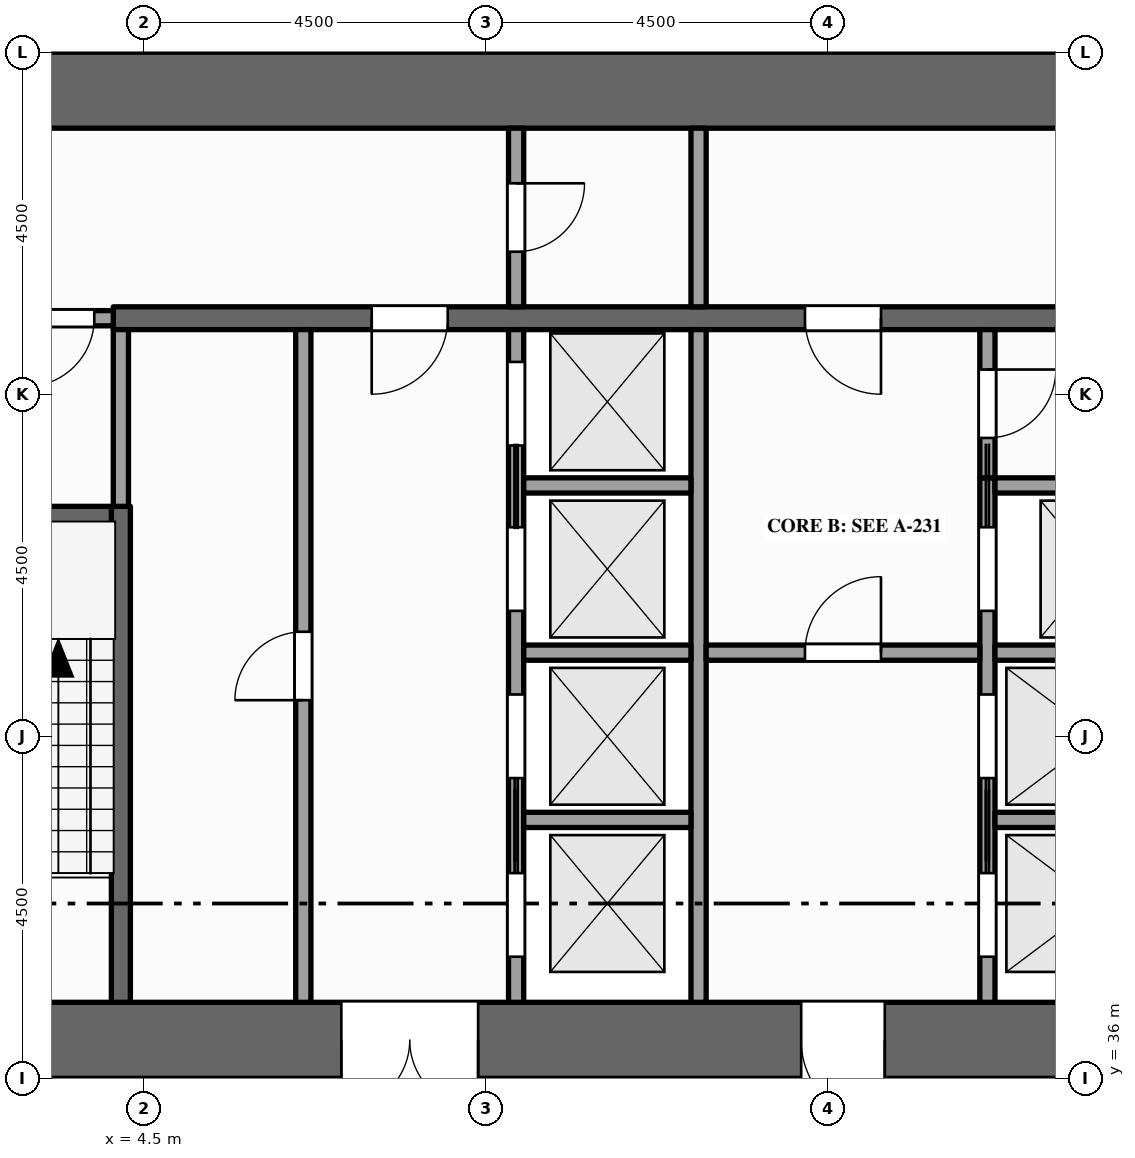
"""IFC4 building model, lengths in metres.
Left out: names, types, materials, properties, quantities, classifications, styles, units other than length and angle.
Written with IfcOpenShell. Run it as: python <this file> out.ifc"""

import sys

from ifc_helpers import new_model, si_unit, direction, frame, frame_2d, origin, place, context, subcontext, project, spatial, rectangle, extrude, element, fill, save


model = new_model("IFC4")
c1 = context("Model", 3, precision=1e-05, world=origin(), true_north=direction((0.0, 1.0)))
c2 = subcontext(c1, "Body", "Model", "MODEL_VIEW")
j1 = project(units=[si_unit("LENGTHUNIT", "METRE"), si_unit("PLANEANGLEUNIT", "RADIAN")], contexts=[c1])
p1 = place(None, origin())
s1 = spatial("IfcSite", under=j1, at=p1, CompositionType="ELEMENT")
p2 = place(p1, origin())
s2 = spatial("IfcBuilding", under=s1, at=p2, CompositionType="ELEMENT")
p3 = place(p2, frame((0.0, 0.0, 171.0)))
s3 = spatial("IfcBuildingStorey", under=s2, at=p3, CompositionType="ELEMENT", Elevation=171.0)
p4 = place(p3, frame((0.0, 36.5, -0.15), z_axis=(0.0, 0.0, 1.0), x_axis=(1.0, 0.0, 0.0)))
e1 = element("IfcWall", 1, at=p4, inside=s3, PredefinedType="SHEAR", context=c2, shape_type="SweptSolid", body=[
    extrude(rectangle(XDim=22.5, YDim=1.0, at=frame_2d((11.25, 0.0))), origin(), (0.0, 0.0, 1.0), 4.0),
])
p5 = place(p4, frame((7.1, 0.0, 0.15)))
e2 = element("IfcOpeningElement", 2, at=p5, cuts=e1, PredefinedType="OPENING", context=c2, shape_type="SweptSolid", body=[
    extrude(rectangle(XDim=1.8, YDim=2.1, at=frame_2d((0.9, 1.05))), frame((0.0, 0.51, 0.0), z_axis=(0.0, -1.0, 0.0), x_axis=(1.0, 0.0, 0.0)), (0.0, 0.0, 1.0), 1.02),
])
p6 = place(p4, frame((13.15, 0.0, 0.15)))
e3 = element("IfcOpeningElement", 3, at=p6, cuts=e1, PredefinedType="OPENING", context=c2, shape_type="SweptSolid", body=[
    extrude(rectangle(XDim=1.1, YDim=2.1, at=frame_2d((0.55, 1.05))), frame((0.0, 0.51, 0.0), z_axis=(0.0, -1.0, 0.0), x_axis=(1.0, 0.0, 0.0)), (0.0, 0.0, 1.0), 1.02),
])
p7 = place(p4, frame((2.15, 0.0, 0.15)))
e4 = element("IfcOpeningElement", 4, at=p7, cuts=e1, PredefinedType="OPENING", context=c2, shape_type="SweptSolid", body=[
    extrude(rectangle(XDim=1.1, YDim=2.1, at=frame_2d((0.55, 1.05))), frame((0.0, 0.51, 0.0), z_axis=(0.0, -1.0, 0.0), x_axis=(1.0, 0.0, 0.0)), (0.0, 0.0, 1.0), 1.02),
])
p8 = place(p4, frame((19.35, 0.0, 0.15)))
e5 = element("IfcOpeningElement", 5, at=p8, cuts=e1, PredefinedType="OPENING", context=c2, shape_type="SweptSolid", body=[
    extrude(rectangle(XDim=1.1, YDim=2.1, at=frame_2d((0.55, 1.05))), frame((0.0, 0.51, 0.0), z_axis=(0.0, -1.0, 0.0), x_axis=(1.0, 0.0, 0.0)), (0.0, 0.0, 1.0), 1.02),
])
p9 = place(p3, frame((0.0, 49.0, -0.15), z_axis=(0.0, 0.0, 1.0), x_axis=(1.0, 0.0, 0.0)))
e6 = element("IfcWall", 6, at=p9, inside=s3, PredefinedType="SHEAR", context=c2, shape_type="SweptSolid", body=[
    extrude(rectangle(XDim=22.5, YDim=1.0, at=frame_2d((11.25, 0.0))), origin(), (0.0, 0.0, 1.0), 4.0),
])
p10 = place(p3, frame((4.2, 37.0, 0.0), z_axis=(0.0, 0.0, 1.0), x_axis=(0.0, 1.0, 0.0)))
e7 = element("IfcWall", 7, at=p10, inside=s3, PredefinedType="SHEAR", context=c2, shape_type="SweptSolid", body=[
    extrude(rectangle(XDim=6.525, YDim=0.25, at=frame_2d((3.262, 0.0))), origin(), (0.0, 0.0, 1.0), 3.85),
])
p11 = place(p3, frame((4.2, 43.525, 0.0), z_axis=(0.0, 0.0, 1.0), x_axis=(0.0, 1.0, 0.0)))
e8 = element("IfcWall", 8, at=p11, inside=s3, PredefinedType="PARTITIONING", context=c2, shape_type="SweptSolid", body=[
    extrude(rectangle(XDim=2.325, YDim=0.2, at=frame_2d((1.163, 0.0))), origin(), (0.0, 0.0, 1.0), 3.85),
])
p12 = place(p3, frame((6.6, 37.0, 0.0), z_axis=(0.0, 0.0, 1.0), x_axis=(0.0, 1.0, 0.0)))
e9 = element("IfcWall", 9, at=p12, inside=s3, PredefinedType="PARTITIONING", context=c2, shape_type="SweptSolid", body=[
    extrude(rectangle(XDim=8.85, YDim=0.2, at=frame_2d((4.425, 0.0))), origin(), (0.0, 0.0, 1.0), 3.85),
])
p13 = place(p12, frame((3.975, 0.0, 0.0)))
e10 = element("IfcOpeningElement", 10, at=p13, cuts=e9, PredefinedType="OPENING", context=c2, shape_type="SweptSolid", body=[
    extrude(rectangle(XDim=0.9, YDim=2.1, at=frame_2d((0.45, 1.05))), frame((0.0, 0.11, 0.0), z_axis=(0.0, -1.0, 0.0), x_axis=(1.0, 0.0, 0.0)), (0.0, 0.0, 1.0), 0.22),
])
p14 = place(p3, frame((9.4, 37.0, 0.0), z_axis=(0.0, 0.0, 1.0), x_axis=(0.0, 1.0, 0.0)))
e11 = element("IfcWall", 11, at=p14, inside=s3, PredefinedType="SOLIDWALL", context=c2, shape_type="SweptSolid", body=[
    extrude(rectangle(XDim=8.85, YDim=0.2, at=frame_2d((4.425, 0.0))), origin(), (0.0, 0.0, 1.0), 3.85),
])
p15 = place(p14, frame((0.6, 0.0, 0.012)))
e12 = element("IfcOpeningElement", 12, at=p15, cuts=e11, PredefinedType="OPENING", context=c2, shape_type="SweptSolid", body=[
    extrude(rectangle(XDim=1.1, YDim=2.1, at=frame_2d((0.55, 1.05))), frame((0.0, 0.11, 0.0), z_axis=(0.0, -1.0, 0.0), x_axis=(1.0, 0.0, 0.0)), (0.0, 0.0, 1.0), 0.22),
])
p16 = place(p14, frame((2.95, 0.0, 0.012)))
e13 = element("IfcOpeningElement", 13, at=p16, cuts=e11, PredefinedType="OPENING", context=c2, shape_type="SweptSolid", body=[
    extrude(rectangle(XDim=1.1, YDim=2.1, at=frame_2d((0.55, 1.05))), frame((0.0, 0.11, 0.0), z_axis=(0.0, -1.0, 0.0), x_axis=(1.0, 0.0, 0.0)), (0.0, 0.0, 1.0), 0.22),
])
p17 = place(p14, frame((5.15, 0.0, 0.012)))
e14 = element("IfcOpeningElement", 14, at=p17, cuts=e11, PredefinedType="OPENING", context=c2, shape_type="SweptSolid", body=[
    extrude(rectangle(XDim=1.1, YDim=2.1, at=frame_2d((0.55, 1.05))), frame((0.0, 0.11, 0.0), z_axis=(0.0, -1.0, 0.0), x_axis=(1.0, 0.0, 0.0)), (0.0, 0.0, 1.0), 0.22),
])
p18 = place(p14, frame((7.325, 0.0, 0.012)))
e15 = element("IfcOpeningElement", 15, at=p18, cuts=e11, PredefinedType="OPENING", context=c2, shape_type="SweptSolid", body=[
    extrude(rectangle(XDim=1.1, YDim=2.1, at=frame_2d((0.55, 1.05))), frame((0.0, 0.11, 0.0), z_axis=(0.0, -1.0, 0.0), x_axis=(1.0, 0.0, 0.0)), (0.0, 0.0, 1.0), 0.22),
])
p19 = place(p3, frame((9.4, 46.15, 0.0), z_axis=(0.0, 0.0, 1.0), x_axis=(0.0, 1.0, 0.0)))
e16 = element("IfcWall", 16, at=p19, inside=s3, PredefinedType="PARTITIONING", context=c2, shape_type="SweptSolid", body=[
    extrude(rectangle(XDim=2.35, YDim=0.2, at=frame_2d((1.175, 0.0))), origin(), (0.0, 0.0, 1.0), 3.85),
])
p20 = place(p19, frame((0.725, 0.0, 0.0)))
e17 = element("IfcOpeningElement", 17, at=p20, cuts=e16, PredefinedType="OPENING", context=c2, shape_type="SweptSolid", body=[
    extrude(rectangle(XDim=0.9, YDim=2.1, at=frame_2d((0.45, 1.05))), frame((0.0, 0.11, 0.0), z_axis=(0.0, -1.0, 0.0), x_axis=(1.0, 0.0, 0.0)), (0.0, 0.0, 1.0), 0.22),
])
p21 = place(p3, frame((11.8, 37.0, 0.0), z_axis=(0.0, 0.0, 1.0), x_axis=(0.0, 1.0, 0.0)))
e18 = element("IfcWall", 18, at=p21, inside=s3, PredefinedType="SOLIDWALL", context=c2, shape_type="SweptSolid", body=[
    extrude(rectangle(XDim=8.85, YDim=0.2, at=frame_2d((4.425, 0.0))), origin(), (0.0, 0.0, 1.0), 3.85),
])
p22 = place(p3, frame((11.8, 46.15, 0.0), z_axis=(0.0, 0.0, 1.0), x_axis=(0.0, 1.0, 0.0)))
e19 = element("IfcWall", 19, at=p22, inside=s3, PredefinedType="PARTITIONING", context=c2, shape_type="SweptSolid", body=[
    extrude(rectangle(XDim=2.35, YDim=0.2, at=frame_2d((1.175, 0.0))), origin(), (0.0, 0.0, 1.0), 3.85),
])
p23 = place(p3, frame((15.6, 37.0, 0.0), z_axis=(0.0, 0.0, 1.0), x_axis=(0.0, 1.0, 0.0)))
e20 = element("IfcWall", 20, at=p23, inside=s3, PredefinedType="SOLIDWALL", context=c2, shape_type="SweptSolid", body=[
    extrude(rectangle(XDim=6.9, YDim=0.2, at=frame_2d((3.45, 0.0))), origin(), (0.0, 0.0, 1.0), 3.85),
])
p24 = place(p23, frame((0.6, 0.0, 0.012)))
e21 = element("IfcOpeningElement", 21, at=p24, cuts=e20, PredefinedType="OPENING", context=c2, shape_type="SweptSolid", body=[
    extrude(rectangle(XDim=1.1, YDim=2.1, at=frame_2d((0.55, 1.05))), frame((0.0, 0.11, 0.0), z_axis=(0.0, -1.0, 0.0), x_axis=(1.0, 0.0, 0.0)), (0.0, 0.0, 1.0), 0.22),
])
p25 = place(p23, frame((2.95, 0.0, 0.012)))
e22 = element("IfcOpeningElement", 22, at=p25, cuts=e20, PredefinedType="OPENING", context=c2, shape_type="SweptSolid", body=[
    extrude(rectangle(XDim=1.1, YDim=2.1, at=frame_2d((0.55, 1.05))), frame((0.0, 0.11, 0.0), z_axis=(0.0, -1.0, 0.0), x_axis=(1.0, 0.0, 0.0)), (0.0, 0.0, 1.0), 0.22),
])
p26 = place(p23, frame((5.15, 0.0, 0.012)))
e23 = element("IfcOpeningElement", 23, at=p26, cuts=e20, PredefinedType="OPENING", context=c2, shape_type="SweptSolid", body=[
    extrude(rectangle(XDim=1.1, YDim=2.1, at=frame_2d((0.55, 1.05))), frame((0.0, 0.11, 0.0), z_axis=(0.0, -1.0, 0.0), x_axis=(1.0, 0.0, 0.0)), (0.0, 0.0, 1.0), 0.22),
])
p27 = place(p3, frame((15.6, 43.9, 0.0), z_axis=(0.0, 0.0, 1.0), x_axis=(0.0, 1.0, 0.0)))
e24 = element("IfcWall", 24, at=p27, inside=s3, PredefinedType="PARTITIONING", context=c2, shape_type="SweptSolid", body=[
    extrude(rectangle(XDim=1.95, YDim=0.2, at=frame_2d((0.975, 0.0))), origin(), (0.0, 0.0, 1.0), 3.85),
])
p28 = place(p27, frame((0.525, 0.0, 0.0)))
e25 = element("IfcOpeningElement", 25, at=p28, cuts=e24, PredefinedType="OPENING", context=c2, shape_type="SweptSolid", body=[
    extrude(rectangle(XDim=0.9, YDim=2.1, at=frame_2d((0.45, 1.05))), frame((0.0, 0.11, 0.0), z_axis=(0.0, -1.0, 0.0), x_axis=(1.0, 0.0, 0.0)), (0.0, 0.0, 1.0), 0.22),
])
p29 = place(p3, frame((9.5, 39.4, 0.0), z_axis=(0.0, 0.0, 1.0), x_axis=(1.0, 0.0, 0.0)))
e26 = element("IfcWall", 26, at=p29, inside=s3, PredefinedType="SOLIDWALL", context=c2, shape_type="SweptSolid", body=[
    extrude(rectangle(XDim=2.2, YDim=0.2, at=frame_2d((1.1, 0.0))), origin(), (0.0, 0.0, 1.0), 3.85),
])
p30 = place(p3, frame((15.7, 39.4, 0.0), z_axis=(0.0, 0.0, 1.0), x_axis=(1.0, 0.0, 0.0)))
e27 = element("IfcWall", 27, at=p30, inside=s3, PredefinedType="SOLIDWALL", context=c2, shape_type="SweptSolid", body=[
    extrude(rectangle(XDim=2.675, YDim=0.2, at=frame_2d((1.337, 0.0))), origin(), (0.0, 0.0, 1.0), 3.85),
])
p31 = place(p3, frame((9.5, 41.6, 0.0), z_axis=(0.0, 0.0, 1.0), x_axis=(1.0, 0.0, 0.0)))
e28 = element("IfcWall", 28, at=p31, inside=s3, PredefinedType="SOLIDWALL", context=c2, shape_type="SweptSolid", body=[
    extrude(rectangle(XDim=2.2, YDim=0.2, at=frame_2d((1.1, 0.0))), origin(), (0.0, 0.0, 1.0), 3.85),
])
p32 = place(p3, frame((11.9, 41.6, 0.0), z_axis=(0.0, 0.0, 1.0), x_axis=(1.0, 0.0, 0.0)))
e29 = element("IfcWall", 29, at=p32, inside=s3, PredefinedType="PARTITIONING", context=c2, shape_type="SweptSolid", body=[
    extrude(rectangle(XDim=3.6, YDim=0.2, at=frame_2d((1.8, 0.0))), origin(), (0.0, 0.0, 1.0), 3.85),
])
p33 = place(p32, frame((1.3, 0.0, 0.0)))
e30 = element("IfcOpeningElement", 30, at=p33, cuts=e29, PredefinedType="OPENING", context=c2, shape_type="SweptSolid", body=[
    extrude(rectangle(XDim=1.0, YDim=2.1, at=frame_2d((0.5, 1.05))), frame((0.0, 0.11, 0.0), z_axis=(0.0, -1.0, 0.0), x_axis=(1.0, 0.0, 0.0)), (0.0, 0.0, 1.0), 0.22),
])
p34 = place(p3, frame((15.7, 41.6, 0.0), z_axis=(0.0, 0.0, 1.0), x_axis=(1.0, 0.0, 0.0)))
e31 = element("IfcWall", 31, at=p34, inside=s3, PredefinedType="SOLIDWALL", context=c2, shape_type="SweptSolid", body=[
    extrude(rectangle(XDim=2.675, YDim=0.2, at=frame_2d((1.337, 0.0))), origin(), (0.0, 0.0, 1.0), 3.85),
])
p35 = place(p3, frame((1.0, 43.4, 0.0), z_axis=(0.0, 0.0, 1.0), x_axis=(1.0, 0.0, 0.0)))
e32 = element("IfcWall", 32, at=p35, inside=s3, PredefinedType="SHEAR", context=c2, shape_type="SweptSolid", body=[
    extrude(rectangle(XDim=3.075, YDim=0.25, at=frame_2d((1.538, 0.0))), origin(), (0.0, 0.0, 1.0), 3.85),
])
p36 = place(p3, frame((9.5, 43.8, 0.0), z_axis=(0.0, 0.0, 1.0), x_axis=(1.0, 0.0, 0.0)))
e33 = element("IfcWall", 33, at=p36, inside=s3, PredefinedType="SOLIDWALL", context=c2, shape_type="SweptSolid", body=[
    extrude(rectangle(XDim=2.2, YDim=0.2, at=frame_2d((1.1, 0.0))), origin(), (0.0, 0.0, 1.0), 3.85),
])
p37 = place(p3, frame((15.7, 43.8, 0.0), z_axis=(0.0, 0.0, 1.0), x_axis=(1.0, 0.0, 0.0)))
e34 = element("IfcWall", 34, at=p37, inside=s3, PredefinedType="SOLIDWALL", context=c2, shape_type="SweptSolid", body=[
    extrude(rectangle(XDim=2.7, YDim=0.2, at=frame_2d((1.35, 0.0))), origin(), (0.0, 0.0, 1.0), 3.85),
])
p38 = place(p3, frame((2.7, 46.0, 0.0), z_axis=(0.0, 0.0, 1.0), x_axis=(1.0, 0.0, 0.0)))
e35 = element("IfcWall", 35, at=p38, inside=s3, PredefinedType="PARTITIONING", context=c2, shape_type="SweptSolid", body=[
    extrude(rectangle(XDim=1.4, YDim=0.2, at=frame_2d((0.7, 0.0))), origin(), (0.0, 0.0, 1.0), 3.85),
])
p39 = place(p38, frame((0.25, 0.0, 0.0)))
e36 = element("IfcOpeningElement", 36, at=p39, cuts=e35, PredefinedType="OPENING", context=c2, shape_type="SweptSolid", body=[
    extrude(rectangle(XDim=0.9, YDim=2.1, at=frame_2d((0.45, 1.05))), frame((0.0, 0.11, 0.0), z_axis=(0.0, -1.0, 0.0), x_axis=(1.0, 0.0, 0.0)), (0.0, 0.0, 1.0), 0.22),
])
p40 = place(p3, frame((4.1, 46.0, 0.0), z_axis=(0.0, 0.0, 1.0), x_axis=(1.0, 0.0, 0.0)))
e37 = element("IfcWall", 37, at=p40, inside=s3, PredefinedType="SHEAR", context=c2, shape_type="SweptSolid", body=[
    extrude(rectangle(XDim=14.5, YDim=0.3, at=frame_2d((7.25, 0.0))), origin(), (0.0, 0.0, 1.0), 3.85),
])
p41 = place(p40, frame((3.4, 0.0, 0.0)))
e38 = element("IfcOpeningElement", 38, at=p41, cuts=e37, PredefinedType="OPENING", context=c2, shape_type="SweptSolid", body=[
    extrude(rectangle(XDim=1.0, YDim=2.1, at=frame_2d((0.5, 1.05))), frame((0.0, 0.16, 0.0), z_axis=(0.0, -1.0, 0.0), x_axis=(1.0, 0.0, 0.0)), (0.0, 0.0, 1.0), 0.32),
])
p42 = place(p40, frame((9.1, 0.0, 0.0)))
e39 = element("IfcOpeningElement", 39, at=p42, cuts=e37, PredefinedType="OPENING", context=c2, shape_type="SweptSolid", body=[
    extrude(rectangle(XDim=1.0, YDim=2.1, at=frame_2d((0.5, 1.05))), frame((0.0, 0.16, 0.0), z_axis=(0.0, -1.0, 0.0), x_axis=(1.0, 0.0, 0.0)), (0.0, 0.0, 1.0), 0.32),
])
p43 = place(p15, origin())
e40 = element("IfcDoor", 40, at=p43, inside=s3, OperationType="SLIDING_TO_RIGHT", PredefinedType="DOOR", context=c2, shape_type="SweptSolid", body=[
    extrude(rectangle(XDim=1.1, YDim=2.1, at=frame_2d((0.55, 1.05))), frame((0.0, 0.025, 0.0), z_axis=(0.0, -1.0, 0.0), x_axis=(1.0, 0.0, 0.0)), (0.0, 0.0, 1.0), 0.05),
])
fill(e12, e40)
p44 = place(p16, origin())
e41 = element("IfcDoor", 41, at=p44, inside=s3, OperationType="SLIDING_TO_LEFT", PredefinedType="DOOR", context=c2, shape_type="SweptSolid", body=[
    extrude(rectangle(XDim=1.1, YDim=2.1, at=frame_2d((0.55, 1.05))), frame((0.0, 0.025, 0.0), z_axis=(0.0, -1.0, 0.0), x_axis=(1.0, 0.0, 0.0)), (0.0, 0.0, 1.0), 0.05),
])
fill(e13, e41)
p45 = place(p17, origin())
e42 = element("IfcDoor", 42, at=p45, inside=s3, OperationType="SLIDING_TO_RIGHT", PredefinedType="DOOR", context=c2, shape_type="SweptSolid", body=[
    extrude(rectangle(XDim=1.1, YDim=2.1, at=frame_2d((0.55, 1.05))), frame((0.0, 0.025, 0.0), z_axis=(0.0, -1.0, 0.0), x_axis=(1.0, 0.0, 0.0)), (0.0, 0.0, 1.0), 0.05),
])
fill(e14, e42)
p46 = place(p18, origin())
e43 = element("IfcDoor", 43, at=p46, inside=s3, OperationType="SLIDING_TO_LEFT", PredefinedType="DOOR", context=c2, shape_type="SweptSolid", body=[
    extrude(rectangle(XDim=1.1, YDim=2.1, at=frame_2d((0.55, 1.05))), frame((0.0, 0.025, 0.0), z_axis=(0.0, -1.0, 0.0), x_axis=(1.0, 0.0, 0.0)), (0.0, 0.0, 1.0), 0.05),
])
fill(e15, e43)
p47 = place(p24, origin())
e44 = element("IfcDoor", 44, at=p47, inside=s3, OperationType="SLIDING_TO_RIGHT", PredefinedType="DOOR", context=c2, shape_type="SweptSolid", body=[
    extrude(rectangle(XDim=1.1, YDim=2.1, at=frame_2d((0.55, 1.05))), frame((0.0, 0.025, 0.0), z_axis=(0.0, -1.0, 0.0), x_axis=(1.0, 0.0, 0.0)), (0.0, 0.0, 1.0), 0.05),
])
fill(e21, e44)
p48 = place(p25, origin())
e45 = element("IfcDoor", 45, at=p48, inside=s3, OperationType="SLIDING_TO_LEFT", PredefinedType="DOOR", context=c2, shape_type="SweptSolid", body=[
    extrude(rectangle(XDim=1.1, YDim=2.1, at=frame_2d((0.55, 1.05))), frame((0.0, 0.025, 0.0), z_axis=(0.0, -1.0, 0.0), x_axis=(1.0, 0.0, 0.0)), (0.0, 0.0, 1.0), 0.05),
])
fill(e22, e45)
p49 = place(p26, origin())
e46 = element("IfcDoor", 46, at=p49, inside=s3, OperationType="SLIDING_TO_RIGHT", PredefinedType="DOOR", context=c2, shape_type="SweptSolid", body=[
    extrude(rectangle(XDim=1.1, YDim=2.1, at=frame_2d((0.55, 1.05))), frame((0.0, 0.025, 0.0), z_axis=(0.0, -1.0, 0.0), x_axis=(1.0, 0.0, 0.0)), (0.0, 0.0, 1.0), 0.05),
])
fill(e23, e46)
p50 = place(p5, origin())
e47 = element("IfcDoor", 47, at=p50, inside=s3, OperationType="DOUBLE_DOOR_SINGLE_SWING", PredefinedType="DOOR", context=c2, shape_type="SweptSolid", body=[
    extrude(rectangle(XDim=1.8, YDim=2.1, at=frame_2d((0.9, 1.05))), frame((0.0, 0.025, 0.0), z_axis=(0.0, -1.0, 0.0), x_axis=(1.0, 0.0, 0.0)), (0.0, 0.0, 1.0), 0.05),
])
fill(e2, e47)
p51 = place(p41, origin())
e48 = element("IfcDoor", 48, at=p51, inside=s3, OperationType="SINGLE_SWING_LEFT", PredefinedType="DOOR", context=c2, shape_type="SweptSolid", body=[
    extrude(rectangle(XDim=1.0, YDim=2.1, at=frame_2d((0.5, 1.05))), frame((0.0, 0.025, 0.0), z_axis=(0.0, -1.0, 0.0), x_axis=(1.0, 0.0, 0.0)), (0.0, 0.0, 1.0), 0.05),
])
fill(e38, e48)
p52 = place(p6, origin())
e49 = element("IfcDoor", 49, at=p52, inside=s3, OperationType="SINGLE_SWING_RIGHT", PredefinedType="DOOR", context=c2, shape_type="SweptSolid", body=[
    extrude(rectangle(XDim=1.1, YDim=2.1, at=frame_2d((0.55, 1.05))), frame((0.0, 0.025, 0.0), z_axis=(0.0, -1.0, 0.0), x_axis=(1.0, 0.0, 0.0)), (0.0, 0.0, 1.0), 0.05),
])
fill(e3, e49)
p53 = place(p33, origin())
e50 = element("IfcDoor", 50, at=p53, inside=s3, OperationType="SINGLE_SWING_RIGHT", PredefinedType="DOOR", context=c2, shape_type="SweptSolid", body=[
    extrude(rectangle(XDim=1.0, YDim=2.1, at=frame_2d((0.5, 1.05))), frame((0.0, 0.025, 0.0), z_axis=(0.0, -1.0, 0.0), x_axis=(1.0, 0.0, 0.0)), (0.0, 0.0, 1.0), 0.05),
])
fill(e30, e50)
p54 = place(p42, origin())
e51 = element("IfcDoor", 51, at=p54, inside=s3, OperationType="SINGLE_SWING_RIGHT", PredefinedType="DOOR", context=c2, shape_type="SweptSolid", body=[
    extrude(rectangle(XDim=1.0, YDim=2.1, at=frame_2d((0.5, 1.05))), frame((0.0, 0.025, 0.0), z_axis=(0.0, -1.0, 0.0), x_axis=(1.0, 0.0, 0.0)), (0.0, 0.0, 1.0), 0.05),
])
fill(e39, e51)
p55 = place(p20, origin())
e52 = element("IfcDoor", 52, at=p55, inside=s3, OperationType="SINGLE_SWING_RIGHT", PredefinedType="DOOR", context=c2, shape_type="SweptSolid", body=[
    extrude(rectangle(XDim=0.9, YDim=2.1, at=frame_2d((0.45, 1.05))), frame((0.0, 0.025, 0.0), z_axis=(0.0, -1.0, 0.0), x_axis=(1.0, 0.0, 0.0)), (0.0, 0.0, 1.0), 0.05),
])
fill(e17, e52)
p56 = place(p39, origin())
e53 = element("IfcDoor", 53, at=p56, inside=s3, OperationType="SINGLE_SWING_LEFT", PredefinedType="DOOR", context=c2, shape_type="SweptSolid", body=[
    extrude(rectangle(XDim=0.9, YDim=2.1, at=frame_2d((0.45, 1.05))), frame((0.0, 0.025, 0.0), z_axis=(0.0, -1.0, 0.0), x_axis=(1.0, 0.0, 0.0)), (0.0, 0.0, 1.0), 0.05),
])
fill(e36, e53)
p57 = place(p13, origin())
e54 = element("IfcDoor", 54, at=p57, inside=s3, OperationType="SINGLE_SWING_LEFT", PredefinedType="DOOR", context=c2, shape_type="SweptSolid", body=[
    extrude(rectangle(XDim=0.9, YDim=2.1, at=frame_2d((0.45, 1.05))), frame((0.0, 0.025, 0.0), z_axis=(0.0, -1.0, 0.0), x_axis=(1.0, 0.0, 0.0)), (0.0, 0.0, 1.0), 0.05),
])
fill(e10, e54)
p58 = place(p28, origin())
e55 = element("IfcDoor", 55, at=p58, inside=s3, OperationType="SINGLE_SWING_RIGHT", PredefinedType="DOOR", context=c2, shape_type="SweptSolid", body=[
    extrude(rectangle(XDim=0.9, YDim=2.1, at=frame_2d((0.45, 1.05))), frame((0.0, 0.025, 0.0), z_axis=(0.0, -1.0, 0.0), x_axis=(1.0, 0.0, 0.0)), (0.0, 0.0, 1.0), 0.05),
])
fill(e25, e55)
save(model, sys.argv[1])
